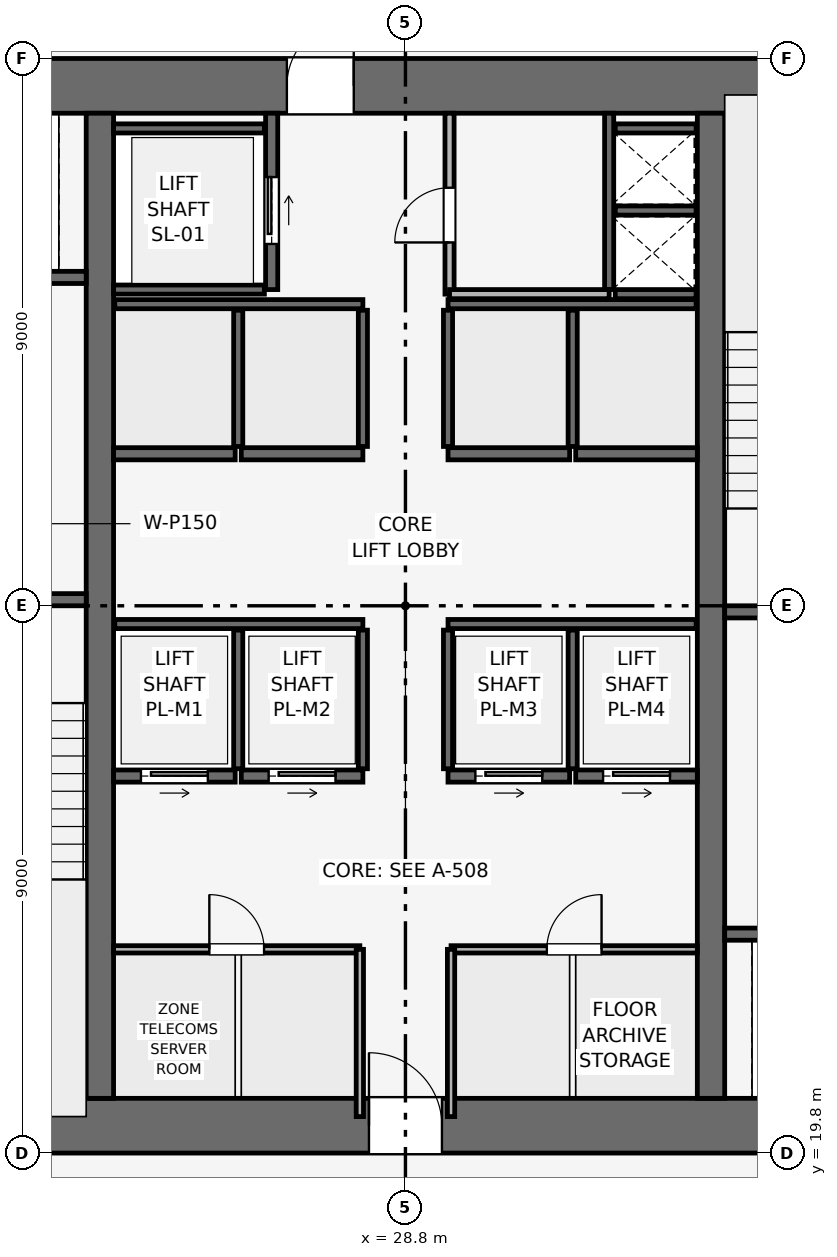
"""IFC4 building model, lengths in metres.
Left out: names, types, materials, properties, quantities, classifications, styles, units other than length and angle.
Written with IfcOpenShell. Run it as: python <this file> out.ifc"""

import sys

from ifc_helpers import new_model, si_unit, direction, frame, frame_2d, origin, place, context, subcontext, project, spatial, rectangle, extrude, element, fill, save


model = new_model("IFC4")
c1 = context("Model", 3, precision=1e-05, world=origin(), true_north=direction((0.0, 1.0)))
c2 = subcontext(c1, "Body", "Model", "MODEL_VIEW")
j1 = project(units=[si_unit("LENGTHUNIT", "METRE"), si_unit("PLANEANGLEUNIT", "RADIAN")], contexts=[c1])
p1 = place(None, origin())
s1 = spatial("IfcSite", under=j1, at=p1, CompositionType="ELEMENT")
p2 = place(p1, origin())
s2 = spatial("IfcBuilding", under=s1, at=p2, CompositionType="ELEMENT")
p3 = place(p2, frame((0.0, 0.0, 179.55)))
s3 = spatial("IfcBuildingStorey", under=s2, at=p3, CompositionType="ELEMENT", Elevation=179.55)
p4 = place(p3, frame((19.8, 20.25, 0.0), z_axis=(0.0, 0.0, 1.0), x_axis=(1.0, 0.0, 0.0)))
e1 = element("IfcWall", 1, at=p4, inside=s3, PredefinedType="SHEAR", context=c2, shape_type="SweptSolid", body=[
    extrude(rectangle(XDim=18.0, YDim=0.9, at=frame_2d((9.0, 0.0))), origin(), (0.0, 0.0, 1.0), 3.75),
])
p5 = place(p4, frame((8.4, 0.0, 0.0)))
e2 = element("IfcOpeningElement", 2, at=p5, cuts=e1, PredefinedType="OPENING", context=c2, shape_type="SweptSolid", body=[
    extrude(rectangle(XDim=1.2, YDim=2.2, at=frame_2d((0.6, 1.1))), frame((0.0, 0.46, 0.0), z_axis=(0.0, -1.0, 0.0), x_axis=(1.0, 0.0, 0.0)), (0.0, 0.0, 1.0), 0.92),
])
p6 = place(p3, frame((19.8, 37.35, 0.0), z_axis=(0.0, 0.0, 1.0), x_axis=(1.0, 0.0, 0.0)))
e3 = element("IfcWall", 3, at=p6, inside=s3, PredefinedType="SHEAR", context=c2, shape_type="SweptSolid", body=[
    extrude(rectangle(XDim=18.0, YDim=0.9, at=frame_2d((9.0, 0.0))), origin(), (0.0, 0.0, 1.0), 3.75),
])
p7 = place(p6, frame((7.05, 0.0, 0.0)))
e4 = element("IfcOpeningElement", 4, at=p7, cuts=e3, PredefinedType="OPENING", context=c2, shape_type="SweptSolid", body=[
    extrude(rectangle(XDim=1.1, YDim=2.15, at=frame_2d((0.55, 1.075))), frame((0.0, 0.46, 0.0), z_axis=(0.0, -1.0, 0.0), x_axis=(1.0, 0.0, 0.0)), (0.0, 0.0, 1.0), 0.92),
])
for number, where, z_axis, x_axis in (
    (5, (23.775, 20.7, 0.0), (0.0, 0.0, 1.0), (0.0, 1.0, 0.0)),
    (6, (33.825, 20.7, 0.0), (0.0, 0.0, 1.0), (0.0, 1.0, 0.0)),
):
    element("IfcWall", number, at=place(p3, frame(where, z_axis=z_axis, x_axis=x_axis)), inside=s3, PredefinedType="SHEAR", context=c2, shape_type="SweptSolid", body=[
        extrude(rectangle(XDim=16.2, YDim=0.45, at=frame_2d((8.1, 0.0))), origin(), (0.0, 0.0, 1.0), 3.75),
    ])
p8 = place(p3, frame((20.4, 28.9, 0.0), z_axis=(0.0, 0.0, 1.0), x_axis=(1.0, 0.0, 0.0)))
e7 = element("IfcWall", 7, at=p8, inside=s3, PredefinedType="SHEAR", context=c2, shape_type="SweptSolid", body=[
    extrude(rectangle(XDim=3.15, YDim=0.2, at=frame_2d((1.575, 0.0))), origin(), (0.0, 0.0, 1.0), 3.495),
])
p9 = place(p8, frame((0.8, 0.0, 0.0)))
e8 = element("IfcOpeningElement", 8, at=p9, cuts=e7, PredefinedType="OPENING", context=c2, shape_type="SweptSolid", body=[
    extrude(rectangle(XDim=1.0, YDim=2.1, at=frame_2d((0.5, 1.05))), frame((0.0, 0.11, 0.0), z_axis=(0.0, -1.0, 0.0), x_axis=(1.0, 0.0, 0.0)), (0.0, 0.0, 1.0), 0.22),
])
p10 = place(p3, frame((34.05, 28.7, 0.0), z_axis=(0.0, 0.0, 1.0), x_axis=(1.0, 0.0, 0.0)))
e9 = element("IfcWall", 9, at=p10, inside=s3, PredefinedType="SHEAR", context=c2, shape_type="SweptSolid", body=[
    extrude(rectangle(XDim=3.15, YDim=0.2, at=frame_2d((1.575, 0.0))), origin(), (0.0, 0.0, 1.0), 3.495),
])
p11 = place(p10, frame((0.8, 0.0, 0.0)))
e10 = element("IfcOpeningElement", 10, at=p11, cuts=e9, PredefinedType="OPENING", context=c2, shape_type="SweptSolid", body=[
    extrude(rectangle(XDim=1.0, YDim=2.1, at=frame_2d((0.5, 1.05))), frame((0.0, 0.11, 0.0), z_axis=(0.0, -1.0, 0.0), x_axis=(1.0, 0.0, 0.0)), (0.0, 0.0, 1.0), 0.22),
])
p12 = place(p3, frame((32.15, 34.0, 0.0), z_axis=(0.0, 0.0, 1.0), x_axis=(0.0, 1.0, 0.0)))
e11 = element("IfcWall", 11, at=p12, inside=s3, PredefinedType="SHEAR", context=c2, shape_type="SweptSolid", body=[
    extrude(rectangle(XDim=2.9, YDim=0.15, at=frame_2d((1.45, 0.0))), origin(), (0.0, 0.0, 1.0), 3.495),
])
for number, where, z_axis, x_axis in (
    (12, (32.25, 33.925, 0.0), (0.0, 0.0, 1.0), (1.0, 0.0, 0.0)),
    (13, (32.25, 35.3, 0.0), (0.0, 0.0, 1.0), (1.0, 0.0, 0.0)),
):
    element("IfcWall", number, at=place(p3, frame(where, z_axis=z_axis, x_axis=x_axis)), inside=s3, PredefinedType="SHEAR", context=c2, shape_type="SweptSolid", body=[
        extrude(rectangle(XDim=1.33, YDim=0.15, at=frame_2d((0.665, 0.0))), origin(), (0.0, 0.0, 1.0), 3.495),
    ])
p13 = place(p3, frame((20.5, 34.2, 0.0), z_axis=(0.0, 0.0, 1.0), x_axis=(1.0, 0.0, 0.0)))
e14 = element("IfcWall", 14, at=p13, inside=s3, PredefinedType="SHEAR", context=c2, shape_type="SweptSolid", body=[
    extrude(rectangle(XDim=3.05, YDim=0.2, at=frame_2d((1.525, 0.0))), origin(), (0.0, 0.0, 1.0), 3.495),
])
p14 = place(p13, frame((0.75, 0.0, 0.0)))
e15 = element("IfcOpeningElement", 15, at=p14, cuts=e14, PredefinedType="OPENING", context=c2, shape_type="SweptSolid", body=[
    extrude(rectangle(XDim=1.1, YDim=2.15, at=frame_2d((0.55, 1.075))), frame((0.0, 0.11, 0.0), z_axis=(0.0, -1.0, 0.0), x_axis=(1.0, 0.0, 0.0)), (0.0, 0.0, 1.0), 0.22),
])
p15 = place(p3, frame((34.05, 23.4, 0.0), z_axis=(0.0, 0.0, 1.0), x_axis=(1.0, 0.0, 0.0)))
e16 = element("IfcWall", 16, at=p15, inside=s3, PredefinedType="SHEAR", context=c2, shape_type="SweptSolid", body=[
    extrude(rectangle(XDim=3.05, YDim=0.2, at=frame_2d((1.525, 0.0))), origin(), (0.0, 0.0, 1.0), 3.495),
])
p16 = place(p15, frame((1.2, 0.0, 0.0)))
e17 = element("IfcOpeningElement", 17, at=p16, cuts=e16, PredefinedType="OPENING", context=c2, shape_type="SweptSolid", body=[
    extrude(rectangle(XDim=1.1, YDim=2.15, at=frame_2d((0.55, 1.075))), frame((0.0, 0.11, 0.0), z_axis=(0.0, -1.0, 0.0), x_axis=(1.0, 0.0, 0.0)), (0.0, 0.0, 1.0), 0.22),
])
p17 = place(p3, frame((26.6, 34.0, 0.0), z_axis=(0.0, 0.0, 1.0), x_axis=(0.0, 1.0, 0.0)))
e18 = element("IfcWall", 18, at=p17, inside=s3, PredefinedType="SHEAR", context=c2, shape_type="SweptSolid", body=[
    extrude(rectangle(XDim=2.9, YDim=0.2, at=frame_2d((1.45, 0.0))), origin(), (0.0, 0.0, 1.0), 3.495),
])
p18 = place(p17, frame((0.75, 0.0, 0.0)))
e19 = element("IfcOpeningElement", 19, at=p18, cuts=e18, PredefinedType="OPENING", context=c2, shape_type="SweptSolid", body=[
    extrude(rectangle(XDim=1.1, YDim=2.15, at=frame_2d((0.55, 1.075))), frame((0.0, 0.11, 0.0), z_axis=(0.0, -1.0, 0.0), x_axis=(1.0, 0.0, 0.0)), (0.0, 0.0, 1.0), 0.22),
])
for number, where, z_axis, x_axis in (
    (20, (24.0, 34.0, 0.0), (0.0, 0.0, 1.0), (1.0, 0.0, 0.0)),
    (21, (24.0, 36.65, 0.0), (0.0, 0.0, 1.0), (1.0, 0.0, 0.0)),
):
    element("IfcWall", number, at=place(p3, frame(where, z_axis=z_axis, x_axis=x_axis)), inside=s3, PredefinedType="SHEAR", context=c2, shape_type="SweptSolid", body=[
        extrude(rectangle(XDim=2.48, YDim=0.15, at=frame_2d((1.24, 0.0))), origin(), (0.0, 0.0, 1.0), 3.495),
    ])
p19 = place(p3, frame((24.0, 26.0, 0.0), z_axis=(0.0, 0.0, 1.0), x_axis=(1.0, 0.0, 0.0)))
e22 = element("IfcWall", 22, at=p19, inside=s3, PredefinedType="SHEAR", context=c2, shape_type="SweptSolid", body=[
    extrude(rectangle(XDim=2.0, YDim=0.2, at=frame_2d((1.0, 0.0))), origin(), (0.0, 0.0, 1.0), 3.495),
])
p20 = place(p19, frame((0.45, 0.0, 0.0)))
e23 = element("IfcOpeningElement", 23, at=p20, cuts=e22, PredefinedType="OPENING", context=c2, shape_type="SweptSolid", body=[
    extrude(rectangle(XDim=1.1, YDim=2.15, at=frame_2d((0.55, 1.075))), frame((0.0, 0.11, 0.0), z_axis=(0.0, -1.0, 0.0), x_axis=(1.0, 0.0, 0.0)), (0.0, 0.0, 1.0), 0.22),
])
p21 = place(p3, frame((26.1, 26.0, 0.0), z_axis=(0.0, 0.0, 1.0), x_axis=(1.0, 0.0, 0.0)))
e24 = element("IfcWall", 24, at=p21, inside=s3, PredefinedType="SHEAR", context=c2, shape_type="SweptSolid", body=[
    extrude(rectangle(XDim=2.0, YDim=0.2, at=frame_2d((1.0, 0.0))), origin(), (0.0, 0.0, 1.0), 3.495),
])
p22 = place(p21, frame((0.45, 0.0, 0.0)))
e25 = element("IfcOpeningElement", 25, at=p22, cuts=e24, PredefinedType="OPENING", context=c2, shape_type="SweptSolid", body=[
    extrude(rectangle(XDim=1.1, YDim=2.15, at=frame_2d((0.55, 1.075))), frame((0.0, 0.11, 0.0), z_axis=(0.0, -1.0, 0.0), x_axis=(1.0, 0.0, 0.0)), (0.0, 0.0, 1.0), 0.22),
])
p23 = place(p3, frame((29.5, 26.0, 0.0), z_axis=(0.0, 0.0, 1.0), x_axis=(1.0, 0.0, 0.0)))
e26 = element("IfcWall", 26, at=p23, inside=s3, PredefinedType="SHEAR", context=c2, shape_type="SweptSolid", body=[
    extrude(rectangle(XDim=2.0, YDim=0.2, at=frame_2d((1.0, 0.0))), origin(), (0.0, 0.0, 1.0), 3.495),
])
p24 = place(p23, frame((0.45, 0.0, 0.0)))
e27 = element("IfcOpeningElement", 27, at=p24, cuts=e26, PredefinedType="OPENING", context=c2, shape_type="SweptSolid", body=[
    extrude(rectangle(XDim=1.1, YDim=2.15, at=frame_2d((0.55, 1.075))), frame((0.0, 0.11, 0.0), z_axis=(0.0, -1.0, 0.0), x_axis=(1.0, 0.0, 0.0)), (0.0, 0.0, 1.0), 0.22),
])
p25 = place(p3, frame((31.6, 26.0, 0.0), z_axis=(0.0, 0.0, 1.0), x_axis=(1.0, 0.0, 0.0)))
e28 = element("IfcWall", 28, at=p25, inside=s3, PredefinedType="SHEAR", context=c2, shape_type="SweptSolid", body=[
    extrude(rectangle(XDim=2.0, YDim=0.2, at=frame_2d((1.0, 0.0))), origin(), (0.0, 0.0, 1.0), 3.495),
])
p26 = place(p25, frame((0.45, 0.0, 0.0)))
e29 = element("IfcOpeningElement", 29, at=p26, cuts=e28, PredefinedType="OPENING", context=c2, shape_type="SweptSolid", body=[
    extrude(rectangle(XDim=1.1, YDim=2.15, at=frame_2d((0.55, 1.075))), frame((0.0, 0.11, 0.0), z_axis=(0.0, -1.0, 0.0), x_axis=(1.0, 0.0, 0.0)), (0.0, 0.0, 1.0), 0.22),
])
for number, where, z_axis, x_axis in (
    (30, (24.0, 31.3, 0.0), (0.0, 0.0, 1.0), (1.0, 0.0, 0.0)),
    (31, (26.1, 31.3, 0.0), (0.0, 0.0, 1.0), (1.0, 0.0, 0.0)),
    (32, (29.5, 31.3, 0.0), (0.0, 0.0, 1.0), (1.0, 0.0, 0.0)),
    (33, (31.6, 31.3, 0.0), (0.0, 0.0, 1.0), (1.0, 0.0, 0.0)),
):
    element("IfcWall", number, at=place(p3, frame(where, z_axis=z_axis, x_axis=x_axis)), inside=s3, PredefinedType="SHEAR", context=c2, shape_type="SweptSolid", body=[
        extrude(rectangle(XDim=2.0, YDim=0.2, at=frame_2d((1.0, 0.0))), origin(), (0.0, 0.0, 1.0), 3.495),
    ])
p27 = place(p3, frame((32.25, 36.65, 0.0), z_axis=(0.0, 0.0, 1.0), x_axis=(1.0, 0.0, 0.0)))
e34 = element("IfcWall", 34, at=p27, inside=s3, PredefinedType="SHEAR", context=c2, shape_type="SweptSolid", body=[
    extrude(rectangle(XDim=1.33, YDim=0.15, at=frame_2d((0.665, 0.0))), origin(), (0.0, 0.0, 1.0), 3.495),
])
for number, where, z_axis, x_axis in (
    (35, (24.02, 28.5, 0.0), (0.0, 0.0, 1.0), (1.0, 0.0, 0.0)),
    (36, (29.5, 28.5, 0.0), (0.0, 0.0, 1.0), (1.0, 0.0, 0.0)),
):
    element("IfcWall", number, at=place(p3, frame(where, z_axis=z_axis, x_axis=x_axis)), inside=s3, PredefinedType="SHEAR", context=c2, shape_type="SweptSolid", body=[
        extrude(rectangle(XDim=4.08, YDim=0.15, at=frame_2d((2.04, 0.0))), origin(), (0.0, 0.0, 1.0), 3.495),
    ])
for number, where, z_axis, x_axis in (
    (37, (26.05, 26.12, 0.0), (0.0, 0.0, 1.0), (0.0, 1.0, 0.0)),
    (38, (28.1, 26.12, 0.0), (0.0, 0.0, 1.0), (0.0, 1.0, 0.0)),
    (39, (29.5, 26.12, 0.0), (0.0, 0.0, 1.0), (0.0, 1.0, 0.0)),
    (40, (31.55, 26.12, 0.0), (0.0, 0.0, 1.0), (0.0, 1.0, 0.0)),
):
    element("IfcWall", number, at=place(p3, frame(where, z_axis=z_axis, x_axis=x_axis)), inside=s3, PredefinedType="SHEAR", context=c2, shape_type="SweptSolid", body=[
        extrude(rectangle(XDim=2.28, YDim=0.15, at=frame_2d((1.14, 0.0))), origin(), (0.0, 0.0, 1.0), 3.495),
    ])
for number, where, z_axis, x_axis in (
    (41, (24.02, 33.76, 0.0), (0.0, 0.0, 1.0), (1.0, 0.0, 0.0)),
    (42, (29.5, 33.76, 0.0), (0.0, 0.0, 1.0), (1.0, 0.0, 0.0)),
):
    element("IfcWall", number, at=place(p3, frame(where, z_axis=z_axis, x_axis=x_axis)), inside=s3, PredefinedType="SHEAR", context=c2, shape_type="SweptSolid", body=[
        extrude(rectangle(XDim=4.08, YDim=0.15, at=frame_2d((2.04, 0.0))), origin(), (0.0, 0.0, 1.0), 3.495),
    ])
for number, where, z_axis, x_axis in (
    (43, (26.05, 31.42, 0.0), (0.0, 0.0, 1.0), (0.0, 1.0, 0.0)),
    (44, (28.1, 31.42, 0.0), (0.0, 0.0, 1.0), (0.0, 1.0, 0.0)),
    (45, (29.5, 31.42, 0.0), (0.0, 0.0, 1.0), (0.0, 1.0, 0.0)),
    (46, (31.55, 31.42, 0.0), (0.0, 0.0, 1.0), (0.0, 1.0, 0.0)),
):
    element("IfcWall", number, at=place(p3, frame(where, z_axis=z_axis, x_axis=x_axis)), inside=s3, PredefinedType="SHEAR", context=c2, shape_type="SweptSolid", body=[
        extrude(rectangle(XDim=2.24, YDim=0.15, at=frame_2d((1.12, 0.0))), origin(), (0.0, 0.0, 1.0), 3.495),
    ])
p28 = place(p3, frame((29.525, 33.925, 0.0), z_axis=(0.0, 0.0, 1.0), x_axis=(0.0, 1.0, 0.0)))
e47 = element("IfcWall", 47, at=p28, inside=s3, PredefinedType="PARTITIONING", context=c2, shape_type="SweptSolid", body=[
    extrude(rectangle(XDim=2.975, YDim=0.15, at=frame_2d((1.487, 0.0))), origin(), (0.0, 0.0, 1.0), 3.495),
])
p29 = place(p28, frame((0.85, 0.0, 0.0)))
e48 = element("IfcOpeningElement", 48, at=p29, cuts=e47, PredefinedType="OPENING", context=c2, shape_type="SweptSolid", body=[
    extrude(rectangle(XDim=0.9, YDim=2.1, at=frame_2d((0.45, 1.05))), frame((0.0, 0.085, 0.0), z_axis=(0.0, -1.0, 0.0), x_axis=(1.0, 0.0, 0.0)), (0.0, 0.0, 1.0), 0.17),
])
p30 = place(p3, frame((29.525, 33.925, 0.0), z_axis=(0.0, 0.0, 1.0), x_axis=(1.0, 0.0, 0.0)))
e49 = element("IfcWall", 49, at=p30, inside=s3, PredefinedType="PARTITIONING", context=c2, shape_type="SweptSolid", body=[
    extrude(rectangle(XDim=2.625, YDim=0.15, at=frame_2d((1.312, 0.0))), origin(), (0.0, 0.0, 1.0), 3.495),
])
p31 = place(p3, frame((24.0, 23.15, 0.0), z_axis=(0.0, 0.0, 1.0), x_axis=(1.0, 0.0, 0.0)))
e50 = element("IfcWall", 50, at=p31, inside=s3, PredefinedType="PARTITIONING", context=c2, shape_type="SweptSolid", body=[
    extrude(rectangle(XDim=4.05, YDim=0.12, at=frame_2d((2.025, 0.0))), origin(), (0.0, 0.0, 1.0), 3.495),
])
p32 = place(p31, frame((1.575, 0.0, 0.0)))
e51 = element("IfcOpeningElement", 51, at=p32, cuts=e50, PredefinedType="OPENING", context=c2, shape_type="SweptSolid", body=[
    extrude(rectangle(XDim=0.9, YDim=2.1, at=frame_2d((0.45, 1.05))), frame((0.0, 0.07, 0.0), z_axis=(0.0, -1.0, 0.0), x_axis=(1.0, 0.0, 0.0)), (0.0, 0.0, 1.0), 0.14),
])
p33 = place(p3, frame((28.05, 20.4, 0.0), z_axis=(0.0, 0.0, 1.0), x_axis=(0.0, 1.0, 0.0)))
e52 = element("IfcWall", 52, at=p33, inside=s3, PredefinedType="PARTITIONING", context=c2, shape_type="SweptSolid", body=[
    extrude(rectangle(XDim=2.75, YDim=0.12, at=frame_2d((1.375, 0.0))), origin(), (0.0, 0.0, 1.0), 3.495),
])
p34 = place(p3, frame((29.55, 23.15, 0.0), z_axis=(0.0, 0.0, 1.0), x_axis=(1.0, 0.0, 0.0)))
e53 = element("IfcWall", 53, at=p34, inside=s3, PredefinedType="PARTITIONING", context=c2, shape_type="SweptSolid", body=[
    extrude(rectangle(XDim=4.05, YDim=0.12, at=frame_2d((2.025, 0.0))), origin(), (0.0, 0.0, 1.0), 3.495),
])
p35 = place(p34, frame((1.575, 0.0, 0.0)))
e54 = element("IfcOpeningElement", 54, at=p35, cuts=e53, PredefinedType="OPENING", context=c2, shape_type="SweptSolid", body=[
    extrude(rectangle(XDim=0.9, YDim=2.1, at=frame_2d((0.45, 1.05))), frame((0.0, 0.07, 0.0), z_axis=(0.0, -1.0, 0.0), x_axis=(1.0, 0.0, 0.0)), (0.0, 0.0, 1.0), 0.14),
])
p36 = place(p3, frame((29.55, 20.4, 0.0), z_axis=(0.0, 0.0, 1.0), x_axis=(0.0, 1.0, 0.0)))
e55 = element("IfcWall", 55, at=p36, inside=s3, PredefinedType="PARTITIONING", context=c2, shape_type="SweptSolid", body=[
    extrude(rectangle(XDim=2.75, YDim=0.12, at=frame_2d((1.375, 0.0))), origin(), (0.0, 0.0, 1.0), 3.495),
])
p37 = place(p18, origin())
e56 = element("IfcDoor", 56, at=p37, inside=s3, OperationType="SLIDING_TO_RIGHT", PredefinedType="DOOR", context=c2, shape_type="SweptSolid", body=[
    extrude(rectangle(XDim=1.1, YDim=2.15, at=frame_2d((0.55, 1.075))), frame((0.0, 0.025, 0.0), z_axis=(0.0, -1.0, 0.0), x_axis=(1.0, 0.0, 0.0)), (0.0, 0.0, 1.0), 0.05),
])
fill(e19, e56)
p38 = place(p20, origin())
e57 = element("IfcDoor", 57, at=p38, inside=s3, OperationType="SLIDING_TO_RIGHT", PredefinedType="DOOR", context=c2, shape_type="SweptSolid", body=[
    extrude(rectangle(XDim=1.1, YDim=2.15, at=frame_2d((0.55, 1.075))), frame((0.0, 0.025, 0.0), z_axis=(0.0, -1.0, 0.0), x_axis=(1.0, 0.0, 0.0)), (0.0, 0.0, 1.0), 0.05),
])
fill(e23, e57)
p39 = place(p22, origin())
e58 = element("IfcDoor", 58, at=p39, inside=s3, OperationType="SLIDING_TO_RIGHT", PredefinedType="DOOR", context=c2, shape_type="SweptSolid", body=[
    extrude(rectangle(XDim=1.1, YDim=2.15, at=frame_2d((0.55, 1.075))), frame((0.0, 0.025, 0.0), z_axis=(0.0, -1.0, 0.0), x_axis=(1.0, 0.0, 0.0)), (0.0, 0.0, 1.0), 0.05),
])
fill(e25, e58)
p40 = place(p24, origin())
e59 = element("IfcDoor", 59, at=p40, inside=s3, OperationType="SLIDING_TO_RIGHT", PredefinedType="DOOR", context=c2, shape_type="SweptSolid", body=[
    extrude(rectangle(XDim=1.1, YDim=2.15, at=frame_2d((0.55, 1.075))), frame((0.0, 0.025, 0.0), z_axis=(0.0, -1.0, 0.0), x_axis=(1.0, 0.0, 0.0)), (0.0, 0.0, 1.0), 0.05),
])
fill(e27, e59)
p41 = place(p26, origin())
e60 = element("IfcDoor", 60, at=p41, inside=s3, OperationType="SLIDING_TO_RIGHT", PredefinedType="DOOR", context=c2, shape_type="SweptSolid", body=[
    extrude(rectangle(XDim=1.1, YDim=2.15, at=frame_2d((0.55, 1.075))), frame((0.0, 0.025, 0.0), z_axis=(0.0, -1.0, 0.0), x_axis=(1.0, 0.0, 0.0)), (0.0, 0.0, 1.0), 0.05),
])
fill(e29, e60)
p42 = place(p29, origin())
e61 = element("IfcDoor", 61, at=p42, inside=s3, OperationType="SINGLE_SWING_LEFT", PredefinedType="DOOR", context=c2, shape_type="SweptSolid", body=[
    extrude(rectangle(XDim=0.9, YDim=2.1, at=frame_2d((0.45, 1.05))), frame((0.0, 0.025, 0.0), z_axis=(0.0, -1.0, 0.0), x_axis=(1.0, 0.0, 0.0)), (0.0, 0.0, 1.0), 0.05),
])
fill(e48, e61)
p43 = place(p32, origin())
e62 = element("IfcDoor", 62, at=p43, inside=s3, OperationType="SINGLE_SWING_LEFT", PredefinedType="DOOR", context=c2, shape_type="SweptSolid", body=[
    extrude(rectangle(XDim=0.9, YDim=2.1, at=frame_2d((0.45, 1.05))), frame((0.0, 0.025, 0.0), z_axis=(0.0, -1.0, 0.0), x_axis=(1.0, 0.0, 0.0)), (0.0, 0.0, 1.0), 0.05),
])
fill(e51, e62)
p44 = place(p35, origin())
e63 = element("IfcDoor", 63, at=p44, inside=s3, OperationType="SINGLE_SWING_RIGHT", PredefinedType="DOOR", context=c2, shape_type="SweptSolid", body=[
    extrude(rectangle(XDim=0.9, YDim=2.1, at=frame_2d((0.45, 1.05))), frame((0.0, 0.025, 0.0), z_axis=(0.0, -1.0, 0.0), x_axis=(1.0, 0.0, 0.0)), (0.0, 0.0, 1.0), 0.05),
])
fill(e54, e63)
p45 = place(p5, origin())
e64 = element("IfcDoor", 64, at=p45, inside=s3, OperationType="SINGLE_SWING_LEFT", PredefinedType="DOOR", context=c2, shape_type="SweptSolid", body=[
    extrude(rectangle(XDim=1.2, YDim=2.2, at=frame_2d((0.6, 1.1))), frame((0.0, 0.025, 0.0), z_axis=(0.0, -1.0, 0.0), x_axis=(1.0, 0.0, 0.0)), (0.0, 0.0, 1.0), 0.05),
])
fill(e2, e64)
p46 = place(p7, origin())
e65 = element("IfcDoor", 65, at=p46, inside=s3, OperationType="SINGLE_SWING_RIGHT", PredefinedType="DOOR", context=c2, shape_type="SweptSolid", body=[
    extrude(rectangle(XDim=1.1, YDim=2.15, at=frame_2d((0.55, 1.075))), frame((0.0, 0.025, 0.0), z_axis=(0.0, -1.0, 0.0), x_axis=(1.0, 0.0, 0.0)), (0.0, 0.0, 1.0), 0.05),
])
fill(e4, e65)
save(model, sys.argv[1])
